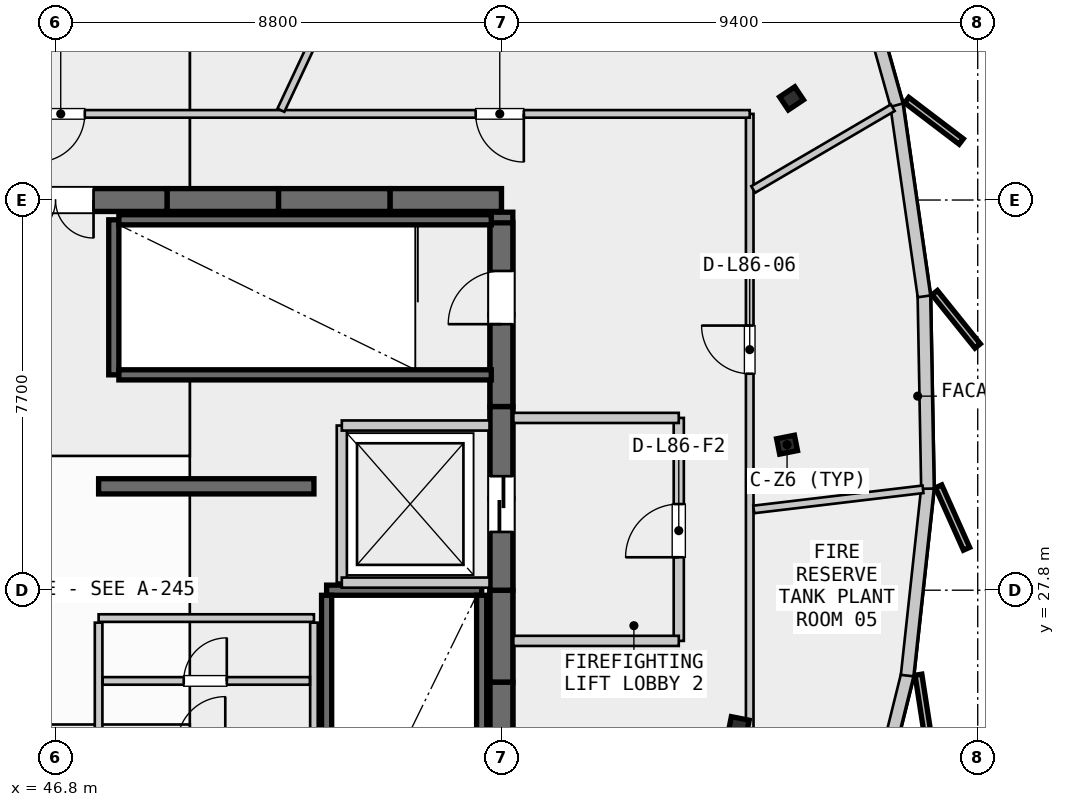
"""IFC4 building model, lengths in metres.
Left out: names, types, materials, properties, quantities, classifications, styles, units other than length and angle.
Written with IfcOpenShell. Run it as: python <this file> out.ifc"""

import sys

from ifc_helpers import new_model, si_unit, direction, frame, frame_2d, origin, origin_2d, place, context, subcontext, project, spatial, rectangle, i_section, extrude, source, transform, mapped, element, fill, save


model = new_model("IFC4")
c1 = context("Model", 3, precision=1e-05, world=origin(), true_north=direction((0.0, 1.0)))
c2 = subcontext(c1, "Body", "Model", "MODEL_VIEW")
j1 = project(units=[si_unit("LENGTHUNIT", "METRE"), si_unit("PLANEANGLEUNIT", "RADIAN")], contexts=[c1])
p1 = place(None, origin())
s1 = spatial("IfcSite", under=j1, at=p1, CompositionType="ELEMENT")
p2 = place(p1, origin())
s2 = spatial("IfcBuilding", under=s1, at=p2, CompositionType="ELEMENT")
p3 = place(p2, frame((0.0, 0.0, 324.3)))
s3 = spatial("IfcBuildingStorey", under=s2, at=p3, CompositionType="ELEMENT", Elevation=324.3)
p4 = place(p3, frame((55.6, 35.5, 0.0), z_axis=(0.0, 0.0, 1.0), x_axis=(-1.0, 0.0, 0.0)))
e1 = element("IfcWall", 1, at=p4, inside=s3, PredefinedType="SHEAR", context=c2, shape_type="SweptSolid", body=[
    extrude(rectangle(XDim=17.6, YDim=0.45, at=frame_2d((8.8, 0.0))), origin(), (0.0, 0.0, 1.0), 4.2),
])
p5 = place(p4, frame((8.05, 0.0, 0.0)))
e2 = element("IfcOpeningElement", 2, at=p5, cuts=e1, PredefinedType="OPENING", context=c2, shape_type="SweptSolid", body=[
    extrude(rectangle(XDim=1.5, YDim=2.2, at=frame_2d((0.75, 1.1))), frame((0.0, 0.235, 0.0), z_axis=(0.0, -1.0, 0.0), x_axis=(1.0, 0.0, 0.0)), (0.0, 0.0, 1.0), 0.47),
])
p6 = place(p4, frame((15.1, 0.0, 0.0)))
e3 = element("IfcOpeningElement", 3, at=p6, cuts=e1, PredefinedType="OPENING", context=c2, shape_type="SweptSolid", body=[
    extrude(rectangle(XDim=0.95, YDim=2.15, at=frame_2d((0.475, 1.075))), frame((0.0, 0.235, 0.0), z_axis=(0.0, -1.0, 0.0), x_axis=(1.0, 0.0, 0.0)), (0.0, 0.0, 1.0), 0.47),
])
p7 = place(p4, frame((12.9, 0.0, 0.0)))
e4 = element("IfcOpeningElement", 4, at=p7, cuts=e1, PredefinedType="OPENING", context=c2, shape_type="SweptSolid", body=[
    extrude(rectangle(XDim=0.9, YDim=2.15, at=frame_2d((0.45, 1.075))), frame((0.0, 0.235, 0.0), z_axis=(0.0, -1.0, 0.0), x_axis=(1.0, 0.0, 0.0)), (0.0, 0.0, 1.0), 0.47),
])
p8 = place(p4, frame((10.6, 0.0, 0.0)))
e5 = element("IfcOpeningElement", 5, at=p8, cuts=e1, PredefinedType="OPENING", context=c2, shape_type="SweptSolid", body=[
    extrude(rectangle(XDim=0.95, YDim=2.15, at=frame_2d((0.475, 1.075))), frame((0.0, 0.235, 0.0), z_axis=(0.0, -1.0, 0.0), x_axis=(1.0, 0.0, 0.0)), (0.0, 0.0, 1.0), 0.47),
])
p9 = place(p3, frame((55.6, 20.34, 0.0), z_axis=(0.0, 0.0, 1.0), x_axis=(0.0, 1.0, 0.0)))
e6 = element("IfcWall", 6, at=p9, inside=s3, PredefinedType="SHEAR", context=c2, shape_type="SweptSolid", body=[
    extrude(rectangle(XDim=14.92, YDim=0.45, at=frame_2d((7.46, 0.0))), origin(), (0.0, 0.0, 1.0), 4.2),
])
p10 = place(p9, frame((12.71, 0.0, 0.0)))
e7 = element("IfcOpeningElement", 7, at=p10, cuts=e6, PredefinedType="OPENING", context=c2, shape_type="SweptSolid", body=[
    extrude(rectangle(XDim=1.05, YDim=2.15, at=frame_2d((0.525, 1.075))), frame((0.0, 0.235, 0.0), z_axis=(0.0, -1.0, 0.0), x_axis=(1.0, 0.0, 0.0)), (0.0, 0.0, 1.0), 0.47),
])
p11 = place(p9, frame((8.61, 0.0, 0.0)))
e8 = element("IfcOpeningElement", 8, at=p11, cuts=e6, PredefinedType="OPENING", context=c2, shape_type="SweptSolid", body=[
    extrude(rectangle(XDim=1.1, YDim=2.2, at=frame_2d((0.55, 1.1))), frame((0.0, 0.235, 0.0), z_axis=(0.0, -1.0, 0.0), x_axis=(1.0, 0.0, 0.0)), (0.0, 0.0, 1.0), 0.47),
])
p12 = place(p3, frame((47.65, 29.85, 0.0), z_axis=(0.0, 0.0, 1.0), x_axis=(1.0, 0.0, 0.0)))
e9 = element("IfcWall", 9, at=p12, inside=s3, PredefinedType="SHEAR", context=c2, shape_type="SweptSolid", body=[
    extrude(rectangle(XDim=4.25, YDim=0.3, at=frame_2d((2.125, 0.0))), origin(), (0.0, 0.0, 1.0), 4.2),
])
m1 = source(origin(), c2, "Body", "SweptSolid", [
    extrude(i_section(OverallWidth=0.309, OverallDepth=0.359, WebThickness=0.016, FlangeThickness=0.026, FilletRadius=0.027, at=origin_2d()), origin(), (0.0, 0.0, 1.0), 9.131),
])
p13 = place(p3, frame((61.237, 30.672, 0.0), z_axis=(0.0, 0.0, 1.0), x_axis=(0.980785280403, 0.195090322016, 0.0)))
e10 = element("IfcColumn", 10, at=p13, inside=s3, PredefinedType="COLUMN", context=c2, shape_type="MappedRepresentation", body=[
    mapped(m1, transform((0.0, 0.0, 0.0), scale=1.0)),
])
m2 = source(origin(), c2, "Body", "SweptSolid", [
    extrude(i_section(OverallWidth=0.309, OverallDepth=0.359, WebThickness=0.016, FlangeThickness=0.026, FilletRadius=0.027, at=origin_2d()), origin(), (0.0, 0.0, 1.0), 10.338),
])
p14 = place(p3, frame((61.326, 37.506, 0.0), z_axis=(0.0, 0.0, 1.0), x_axis=(0.831469612303, 0.55557023302, 0.0)))
e11 = element("IfcColumn", 11, at=p14, inside=s3, PredefinedType="COLUMN", context=c2, shape_type="MappedRepresentation", body=[
    mapped(m2, transform((0.0, 0.0, 0.0), scale=1.0)),
])
m3 = source(origin(), c2, "Body", "SweptSolid", [
    extrude(i_section(OverallWidth=0.309, OverallDepth=0.359, WebThickness=0.016, FlangeThickness=0.026, FilletRadius=0.027, at=origin_2d()), origin(), (0.0, 0.0, 1.0), 8.099),
])
p15 = place(p3, frame((60.284, 25.118, 0.0), z_axis=(0.0, 0.0, 1.0), x_axis=(0.980785280403, -0.195090322016, 0.0)))
e12 = element("IfcColumn", 12, at=p15, inside=s3, PredefinedType="COLUMN", context=c2, shape_type="MappedRepresentation", body=[
    mapped(m3, transform((0.0, 0.0, 0.0), scale=1.0)),
])
p16 = place(p3, frame((55.6, 35.5, 4.2), z_axis=(0.0, 0.0, 1.0), x_axis=(-1.0, 0.0, 0.0)))
e13 = element("IfcWall", 13, at=p16, inside=s3, PredefinedType="SHEAR", context=c2, shape_type="SweptSolid", body=[
    extrude(rectangle(XDim=2.2, YDim=0.45, at=frame_2d((1.1, 0.0))), origin(), (0.0, 0.0, 1.0), 5.342),
])
p17 = place(p3, frame((53.4, 35.5, 4.2), z_axis=(0.0, 0.0, 1.0), x_axis=(-1.0, 0.0, 0.0)))
e14 = element("IfcWall", 14, at=p17, inside=s3, PredefinedType="SHEAR", context=c2, shape_type="SweptSolid", body=[
    extrude(rectangle(XDim=2.2, YDim=0.45, at=frame_2d((1.1, 0.0))), origin(), (0.0, 0.0, 1.0), 5.216),
])
p18 = place(p3, frame((51.2, 35.5, 4.2), z_axis=(0.0, 0.0, 1.0), x_axis=(-1.0, 0.0, 0.0)))
e15 = element("IfcWall", 15, at=p18, inside=s3, PredefinedType="SHEAR", context=c2, shape_type="SweptSolid", body=[
    extrude(rectangle(XDim=2.2, YDim=0.45, at=frame_2d((1.1, 0.0))), origin(), (0.0, 0.0, 1.0), 5.091),
])
p19 = place(p3, frame((49.0, 35.5, 4.2), z_axis=(0.0, 0.0, 1.0), x_axis=(-1.0, 0.0, 0.0)))
e16 = element("IfcWall", 16, at=p19, inside=s3, PredefinedType="SHEAR", context=c2, shape_type="SweptSolid", body=[
    extrude(rectangle(XDim=2.2, YDim=0.45, at=frame_2d((1.1, 0.0))), origin(), (0.0, 0.0, 1.0), 4.965),
])
p20 = place(p3, frame((46.8, 35.5, 4.2), z_axis=(0.0, 0.0, 1.0), x_axis=(-1.0, 0.0, 0.0)))
e17 = element("IfcWall", 17, at=p20, inside=s3, PredefinedType="SHEAR", context=c2, shape_type="SweptSolid", body=[
    extrude(rectangle(XDim=2.2, YDim=0.45, at=frame_2d((1.1, 0.0))), origin(), (0.0, 0.0, 1.0), 4.839),
])
p21 = place(p3, frame((55.6, 24.175, 4.2), z_axis=(0.0, 0.0, 1.0), x_axis=(0.0, 1.0, 0.0)))
e18 = element("IfcWall", 18, at=p21, inside=s3, PredefinedType="SHEAR", context=c2, shape_type="SweptSolid", body=[
    extrude(rectangle(XDim=1.812, YDim=0.45, at=frame_2d((0.906, 0.0))), origin(), (0.0, 0.0, 1.0), 3.475),
])
p22 = place(p3, frame((55.6, 25.988, 4.2), z_axis=(0.0, 0.0, 1.0), x_axis=(0.0, 1.0, 0.0)))
e19 = element("IfcWall", 19, at=p22, inside=s3, PredefinedType="SHEAR", context=c2, shape_type="SweptSolid", body=[
    extrude(rectangle(XDim=1.812, YDim=0.45, at=frame_2d((0.906, 0.0))), origin(), (0.0, 0.0, 1.0), 3.794),
])
p23 = place(p3, frame((55.6, 27.8, 4.2), z_axis=(0.0, 0.0, 1.0), x_axis=(0.0, 1.0, 0.0)))
e20 = element("IfcWall", 20, at=p23, inside=s3, PredefinedType="SHEAR", context=c2, shape_type="SweptSolid", body=[
    extrude(rectangle(XDim=1.812, YDim=0.45, at=frame_2d((0.906, 0.0))), origin(), (0.0, 0.0, 1.0), 4.113),
])
p24 = place(p3, frame((55.6, 29.613, 4.2), z_axis=(0.0, 0.0, 1.0), x_axis=(0.0, 1.0, 0.0)))
e21 = element("IfcWall", 21, at=p24, inside=s3, PredefinedType="SHEAR", context=c2, shape_type="SweptSolid", body=[
    extrude(rectangle(XDim=1.812, YDim=0.45, at=frame_2d((0.906, 0.0))), origin(), (0.0, 0.0, 1.0), 4.432),
])
p25 = place(p3, frame((55.6, 31.425, 4.2), z_axis=(0.0, 0.0, 1.0), x_axis=(0.0, 1.0, 0.0)))
e22 = element("IfcWall", 22, at=p25, inside=s3, PredefinedType="SHEAR", context=c2, shape_type="SweptSolid", body=[
    extrude(rectangle(XDim=1.812, YDim=0.45, at=frame_2d((0.906, 0.0))), origin(), (0.0, 0.0, 1.0), 4.751),
])
p26 = place(p3, frame((55.6, 33.238, 4.2), z_axis=(0.0, 0.0, 1.0), x_axis=(0.0, 1.0, 0.0)))
e23 = element("IfcWall", 23, at=p26, inside=s3, PredefinedType="SHEAR", context=c2, shape_type="SweptSolid", body=[
    extrude(rectangle(XDim=1.812, YDim=0.45, at=frame_2d((0.906, 0.0))), origin(), (0.0, 0.0, 1.0), 5.07),
])
p27 = place(p3, frame((62.736, 22.612, 7.81), z_axis=(0.0, 0.0, 1.0), x_axis=(0.240920629771, 0.970544821299, 0.0)))
e24 = element("IfcWall", 24, at=p27, inside=s3, PredefinedType="PARAPET", context=c2, shape_type="SweptSolid", body=[
    extrude(rectangle(XDim=3.629, YDim=0.25, at=frame_2d((1.814, 0.0))), origin(), (0.0, 0.0, 1.0), 0.355),
])
p28 = place(p3, frame((63.607, 26.115, 8.48), z_axis=(0.0, 0.0, 1.0), x_axis=(0.107980393633, 0.99415302373, 0.0)))
e25 = element("IfcWall", 25, at=p28, inside=s3, PredefinedType="PARAPET", context=c2, shape_type="SweptSolid", body=[
    extrude(rectangle(XDim=3.728, YDim=0.25, at=frame_2d((1.864, 0.0))), origin(), (0.0, 0.0, 1.0), 0.357),
])
p29 = place(p3, frame((64.009, 29.804, 9.155), z_axis=(0.0, 0.0, 1.0), x_axis=(-0.018444210135, 0.999829891088, 0.0)))
e26 = element("IfcWall", 26, at=p29, inside=s3, PredefinedType="PARAPET", context=c2, shape_type="SweptSolid", body=[
    extrude(rectangle(XDim=3.812, YDim=0.25, at=frame_2d((1.906, 0.0))), origin(), (0.0, 0.0, 1.0), 0.353),
])
p30 = place(p3, frame((63.94, 33.598, 9.822), z_axis=(0.0, 0.0, 1.0), x_axis=(-0.142135182267, 0.989847255874, 0.0)))
e27 = element("IfcWall", 27, at=p30, inside=s3, PredefinedType="PARAPET", context=c2, shape_type="SweptSolid", body=[
    extrude(rectangle(XDim=3.83, YDim=0.25, at=frame_2d((1.915, 0.0))), origin(), (0.0, 0.0, 1.0), 0.338),
])
p31 = place(p3, frame((63.399, 37.372, 10.458), z_axis=(0.0, 0.0, 1.0), x_axis=(-0.270399124289, 0.962748312688, 0.0)))
e28 = element("IfcWall", 28, at=p31, inside=s3, PredefinedType="PARAPET", context=c2, shape_type="SweptSolid", body=[
    extrude(rectangle(XDim=3.755, YDim=0.25, at=frame_2d((1.877, 0.0))), origin(), (0.0, 0.0, 1.0), 0.309),
])
p32 = place(p3, frame((52.15, 27.8, 0.0), z_axis=(0.0, 0.0, 1.0), x_axis=(1.0, 0.0, 0.0)))
e29 = element("IfcWall", 29, at=p32, inside=s3, PredefinedType="SHEAR", context=c2, shape_type="SweptSolid", body=[
    extrude(rectangle(XDim=3.06, YDim=0.2, at=frame_2d((1.53, 0.0))), origin(), (0.0, 0.0, 1.0), 4.2),
])
for number, where, z_axis, x_axis in (
    (30, (55.21, 27.7, 0.0), (0.0, 0.0, 1.0), (0.0, -1.0, 0.0)),
    (31, (52.15, 20.35, 0.0), (0.0, 0.0, 1.0), (0.0, 1.0, 0.0)),
):
    element("IfcWall", number, at=place(p3, frame(where, z_axis=z_axis, x_axis=x_axis)), inside=s3, PredefinedType="SHEAR", context=c2, shape_type="SweptSolid", body=[
        extrude(rectangle(XDim=7.35, YDim=0.2, at=frame_2d((3.675, 0.0))), origin(), (0.0, 0.0, 1.0), 4.2),
    ])
p33 = place(p3, frame((47.95, 32.05, 0.0), z_axis=(0.0, 0.0, 1.0), x_axis=(0.0, 1.0, 0.0)))
e32 = element("IfcWall", 32, at=p33, inside=s3, PredefinedType="SHEAR", context=c2, shape_type="SweptSolid", body=[
    extrude(rectangle(XDim=3.06, YDim=0.2, at=frame_2d((1.53, 0.0))), origin(), (0.0, 0.0, 1.0), 4.2),
])
for number, where, z_axis, x_axis in (
    (33, (48.05, 35.11, 0.0), (0.0, 0.0, 1.0), (1.0, 0.0, 0.0)),
    (34, (55.4, 32.05, 0.0), (0.0, 0.0, 1.0), (-1.0, 0.0, 0.0)),
):
    element("IfcWall", number, at=place(p3, frame(where, z_axis=z_axis, x_axis=x_axis)), inside=s3, PredefinedType="SHEAR", context=c2, shape_type="SweptSolid", body=[
        extrude(rectangle(XDim=7.35, YDim=0.2, at=frame_2d((3.675, 0.0))), origin(), (0.0, 0.0, 1.0), 4.2),
    ])
p34 = place(p3, frame((52.45, 27.95, 0.0), z_axis=(0.0, 0.0, 1.0), x_axis=(0.0, 1.0, 0.0)))
e35 = element("IfcWall", 35, at=p34, inside=s3, PredefinedType="PARTITIONING", context=c2, shape_type="SweptSolid", body=[
    extrude(rectangle(XDim=3.1, YDim=0.2, at=frame_2d((1.55, 0.0))), origin(), (0.0, 0.0, 1.0), 2.76),
])
for number, where, z_axis, x_axis in (
    (36, (52.45, 27.95, 0.0), (0.0, 0.0, 1.0), (1.0, 0.0, 0.0)),
    (37, (52.45, 31.05, 0.0), (0.0, 0.0, 1.0), (1.0, 0.0, 0.0)),
):
    element("IfcWall", number, at=place(p3, frame(where, z_axis=z_axis, x_axis=x_axis)), inside=s3, PredefinedType="PARTITIONING", context=c2, shape_type="SweptSolid", body=[
        extrude(rectangle(XDim=2.915, YDim=0.2, at=frame_2d((1.458, 0.0))), origin(), (0.0, 0.0, 1.0), 3.49),
    ])
p35 = place(p3, frame((59.1, 26.8, 0.0), z_axis=(0.0, 0.0, 1.0), x_axis=(0.0, 1.0, 0.0)))
e38 = element("IfcWall", 38, at=p35, inside=s3, PredefinedType="PARTITIONING", context=c2, shape_type="SweptSolid", body=[
    extrude(rectangle(XDim=4.4, YDim=0.2, at=frame_2d((2.2, 0.0))), origin(), (0.0, 0.0, 1.0), 3.49),
])
p36 = place(p35, frame((1.65, 0.0, 0.0)))
e39 = element("IfcOpeningElement", 39, at=p36, cuts=e38, PredefinedType="OPENING", context=c2, shape_type="SweptSolid", body=[
    extrude(rectangle(XDim=1.05, YDim=2.15, at=frame_2d((0.525, 1.075))), frame((0.0, 0.11, 0.0), z_axis=(0.0, -1.0, 0.0), x_axis=(1.0, 0.0, 0.0)), (0.0, 0.0, 1.0), 0.22),
])
for number, where, z_axis, x_axis in (
    (40, (55.835, 26.8, 0.0), (0.0, 0.0, 1.0), (1.0, 0.0, 0.0)),
    (41, (55.835, 31.2, 0.0), (0.0, 0.0, 1.0), (1.0, 0.0, 0.0)),
):
    element("IfcWall", number, at=place(p3, frame(where, z_axis=z_axis, x_axis=x_axis)), inside=s3, PredefinedType="PARTITIONING", context=c2, shape_type="SweptSolid", body=[
        extrude(rectangle(XDim=3.265, YDim=0.2, at=frame_2d((1.633, 0.0))), origin(), (0.0, 0.0, 1.0), 3.49),
    ])
p37 = place(p3, frame((47.65, 27.25, 0.0), z_axis=(0.0, 0.0, 1.0), x_axis=(1.0, 0.0, 0.0)))
e42 = element("IfcWall", 42, at=p37, inside=s3, PredefinedType="PARTITIONING", context=c2, shape_type="SweptSolid", body=[
    extrude(rectangle(XDim=4.25, YDim=0.15, at=frame_2d((2.125, 0.0))), origin(), (0.0, 0.0, 1.0), 2.76),
])
for number, where, z_axis, x_axis in (
    (43, (47.65, 24.92, 0.0), (0.0, 0.0, 1.0), (0.0, 1.0, 0.0)),
    (44, (51.9, 24.92, 0.0), (0.0, 0.0, 1.0), (0.0, 1.0, 0.0)),
):
    element("IfcWall", number, at=place(p3, frame(where, z_axis=z_axis, x_axis=x_axis)), inside=s3, PredefinedType="PARTITIONING", context=c2, shape_type="SweptSolid", body=[
        extrude(rectangle(XDim=2.24, YDim=0.15, at=frame_2d((1.12, 0.0))), origin(), (0.0, 0.0, 1.0), 2.76),
    ])
p38 = place(p3, frame((47.73, 26.01, 0.0), z_axis=(0.0, 0.0, 1.0), x_axis=(1.0, 0.0, 0.0)))
e45 = element("IfcWall", 45, at=p38, inside=s3, PredefinedType="PARTITIONING", context=c2, shape_type="SweptSolid", body=[
    extrude(rectangle(XDim=4.09, YDim=0.15, at=frame_2d((2.045, 0.0))), origin(), (0.0, 0.0, 1.0), 2.76),
])
p39 = place(p38, frame((1.6, 0.0, 0.0)))
e46 = element("IfcOpeningElement", 46, at=p39, cuts=e45, PredefinedType="OPENING", context=c2, shape_type="SweptSolid", body=[
    extrude(rectangle(XDim=0.85, YDim=2.15, at=frame_2d((0.425, 1.075))), frame((0.0, 0.085, 0.0), z_axis=(0.0, -1.0, 0.0), x_axis=(1.0, 0.0, 0.0)), (0.0, 0.0, 1.0), 0.17),
])
p40 = place(p3, frame((60.5, 18.4, 0.0), z_axis=(0.0, 0.0, 1.0), x_axis=(0.0, 1.0, 0.0)))
e47 = element("IfcWall", 47, at=p40, inside=s3, PredefinedType="PARTITIONING", context=c2, shape_type="SweptSolid", body=[
    extrude(rectangle(XDim=18.8, YDim=0.15, at=frame_2d((9.4, 0.0))), origin(), (0.0, 0.0, 1.0), 3.49),
])
p41 = place(p40, frame((4.508, 0.0, 0.0)))
e48 = element("IfcOpeningElement", 48, at=p41, cuts=e47, PredefinedType="OPENING", context=c2, shape_type="SweptSolid", body=[
    extrude(rectangle(XDim=0.95, YDim=2.15, at=frame_2d((0.475, 1.075))), frame((0.0, 0.085, 0.0), z_axis=(0.0, -1.0, 0.0), x_axis=(1.0, 0.0, 0.0)), (0.0, 0.0, 1.0), 0.17),
])
p42 = place(p40, frame((13.673, 0.0, 0.0)))
e49 = element("IfcOpeningElement", 49, at=p42, cuts=e47, PredefinedType="OPENING", context=c2, shape_type="SweptSolid", body=[
    extrude(rectangle(XDim=0.95, YDim=2.15, at=frame_2d((0.475, 1.075))), frame((0.0, 0.085, 0.0), z_axis=(0.0, -1.0, 0.0), x_axis=(1.0, 0.0, 0.0)), (0.0, 0.0, 1.0), 0.17),
])
p43 = place(p3, frame((60.5, 37.2, 0.0), z_axis=(0.0, 0.0, 1.0), x_axis=(-1.0, 0.0, 0.0)))
e50 = element("IfcWall", 50, at=p43, inside=s3, PredefinedType="PARTITIONING", context=c2, shape_type="SweptSolid", body=[
    extrude(rectangle(XDim=27.4, YDim=0.15, at=frame_2d((13.7, 0.0))), origin(), (0.0, 0.0, 1.0), 3.49),
])
p44 = place(p43, frame((4.458, 0.0, 0.0)))
e51 = element("IfcOpeningElement", 51, at=p44, cuts=e50, PredefinedType="OPENING", context=c2, shape_type="SweptSolid", body=[
    extrude(rectangle(XDim=0.95, YDim=2.15, at=frame_2d((0.475, 1.075))), frame((0.0, 0.085, 0.0), z_axis=(0.0, -1.0, 0.0), x_axis=(1.0, 0.0, 0.0)), (0.0, 0.0, 1.0), 0.17),
])
p45 = place(p43, frame((13.122, 0.0, 0.0)))
e52 = element("IfcOpeningElement", 52, at=p45, cuts=e50, PredefinedType="OPENING", context=c2, shape_type="SweptSolid", body=[
    extrude(rectangle(XDim=0.95, YDim=2.15, at=frame_2d((0.475, 1.075))), frame((0.0, 0.085, 0.0), z_axis=(0.0, -1.0, 0.0), x_axis=(1.0, 0.0, 0.0)), (0.0, 0.0, 1.0), 0.17),
])
p46 = place(p43, frame((20.51, 0.0, 0.0)))
e53 = element("IfcOpeningElement", 53, at=p46, cuts=e50, PredefinedType="OPENING", context=c2, shape_type="SweptSolid", body=[
    extrude(rectangle(XDim=0.95, YDim=2.15, at=frame_2d((0.475, 1.075))), frame((0.0, 0.085, 0.0), z_axis=(0.0, -1.0, 0.0), x_axis=(1.0, 0.0, 0.0)), (0.0, 0.0, 1.0), 0.17),
])
p47 = place(p3, frame((60.579, 29.394, 0.0), z_axis=(0.0, 0.0, 1.0), x_axis=(0.992996182228, 0.118146443373, 0.0)))
e54 = element("IfcWall", 54, at=p47, inside=s3, PredefinedType="PARTITIONING", context=c2, shape_type="SweptSolid", body=[
    extrude(rectangle(XDim=3.364, YDim=0.15, at=frame_2d((1.682, 0.0))), origin(), (0.0, 0.0, 1.0), 3.49),
])
p48 = place(p3, frame((60.569, 35.708, 0.0), z_axis=(0.0, 0.0, 1.0), x_axis=(0.862817602566, 0.505515365446, 0.0)))
e55 = element("IfcWall", 55, at=p48, inside=s3, PredefinedType="PARTITIONING", context=c2, shape_type="SweptSolid", body=[
    extrude(rectangle(XDim=3.192, YDim=0.15, at=frame_2d((1.596, 0.0))), origin(), (0.0, 0.0, 1.0), 3.49),
])
p49 = place(p3, frame((51.248, 37.272, 0.0), z_axis=(0.0, 0.0, 1.0), x_axis=(0.424864941596, 0.905256748885, 0.0)))
e56 = element("IfcWall", 56, at=p49, inside=s3, PredefinedType="PARTITIONING", context=c2, shape_type="SweptSolid", body=[
    extrude(rectangle(XDim=12.869, YDim=0.15, at=frame_2d((6.435, 0.0))), origin(), (0.0, 0.0, 1.0), 3.49),
])
m4 = source(origin(), c2, "Body", "SweptSolid", [
    extrude(rectangle(XDim=1.05, YDim=2.15, at=frame_2d((0.525, 1.075))), frame((0.0, 0.025, 0.0), z_axis=(0.0, -1.0, 0.0), x_axis=(1.0, 0.0, 0.0)), (0.0, 0.0, 1.0), 0.05),
])
p50 = place(p10, origin())
e57 = element("IfcDoor", 57, at=p50, inside=s3, OperationType="SINGLE_SWING_LEFT", PredefinedType="DOOR", context=c2, shape_type="MappedRepresentation", body=[
    mapped(m4, transform((0.0, 0.0, 0.0), scale=1.0)),
])
fill(e7, e57)
m5 = source(origin(), c2, "Body", "SweptSolid", [
    extrude(rectangle(XDim=1.5, YDim=2.2, at=frame_2d((0.75, 1.1))), frame((0.0, 0.025, 0.0), z_axis=(0.0, -1.0, 0.0), x_axis=(1.0, 0.0, 0.0)), (0.0, 0.0, 1.0), 0.05),
])
p51 = place(p5, origin())
e58 = element("IfcDoor", 58, at=p51, inside=s3, OperationType="DOUBLE_DOOR_SINGLE_SWING", PredefinedType="DOOR", context=c2, shape_type="MappedRepresentation", body=[
    mapped(m5, transform((0.0, 0.0, 0.0), scale=1.0)),
])
fill(e2, e58)
m6 = source(origin(), c2, "Body", "SweptSolid", [
    extrude(rectangle(XDim=1.1, YDim=2.2, at=frame_2d((0.55, 1.1))), frame((0.0, 0.025, 0.0), z_axis=(0.0, -1.0, 0.0), x_axis=(1.0, 0.0, 0.0)), (0.0, 0.0, 1.0), 0.05),
])
p52 = place(p11, origin())
e59 = element("IfcDoor", 59, at=p52, inside=s3, OperationType="SLIDING_TO_RIGHT", PredefinedType="DOOR", context=c2, shape_type="MappedRepresentation", body=[
    mapped(m6, transform((0.0, 0.0, 0.0), scale=1.0)),
])
fill(e8, e59)
p53 = place(p36, origin())
e60 = element("IfcDoor", 60, at=p53, inside=s3, OperationType="SINGLE_SWING_LEFT", PredefinedType="DOOR", context=c2, shape_type="MappedRepresentation", body=[
    mapped(m4, transform((0.0, 0.0, 0.0), scale=1.0)),
])
fill(e39, e60)
m7 = source(origin(), c2, "Body", "SweptSolid", [
    extrude(rectangle(XDim=0.85, YDim=2.15, at=frame_2d((0.425, 1.075))), frame((0.0, 0.025, 0.0), z_axis=(0.0, -1.0, 0.0), x_axis=(1.0, 0.0, 0.0)), (0.0, 0.0, 1.0), 0.05),
])
p54 = place(p39, origin())
e61 = element("IfcDoor", 61, at=p54, inside=s3, OperationType="SINGLE_SWING_RIGHT", PredefinedType="DOOR", context=c2, shape_type="MappedRepresentation", body=[
    mapped(m7, transform((0.0, 0.0, 0.0), scale=1.0)),
])
fill(e46, e61)
m8 = source(origin(), c2, "Body", "SweptSolid", [
    extrude(rectangle(XDim=0.95, YDim=2.15, at=frame_2d((0.475, 1.075))), frame((0.0, 0.025, 0.0), z_axis=(0.0, -1.0, 0.0), x_axis=(1.0, 0.0, 0.0)), (0.0, 0.0, 1.0), 0.05),
])
p55 = place(p42, origin())
e62 = element("IfcDoor", 62, at=p55, inside=s3, OperationType="SINGLE_SWING_RIGHT", PredefinedType="DOOR", context=c2, shape_type="MappedRepresentation", body=[
    mapped(m8, transform((0.0, 0.0, 0.0), scale=1.0)),
])
fill(e49, e62)
p56 = place(p44, origin())
e63 = element("IfcDoor", 63, at=p56, inside=s3, OperationType="SINGLE_SWING_LEFT", PredefinedType="DOOR", context=c2, shape_type="MappedRepresentation", body=[
    mapped(m8, transform((0.0, 0.0, 0.0), scale=1.0)),
])
fill(e51, e63)
p57 = place(p45, origin())
e64 = element("IfcDoor", 64, at=p57, inside=s3, OperationType="SINGLE_SWING_RIGHT", PredefinedType="DOOR", context=c2, shape_type="MappedRepresentation", body=[
    mapped(m8, transform((0.0, 0.0, 0.0), scale=1.0)),
])
fill(e52, e64)
save(model, sys.argv[1])
